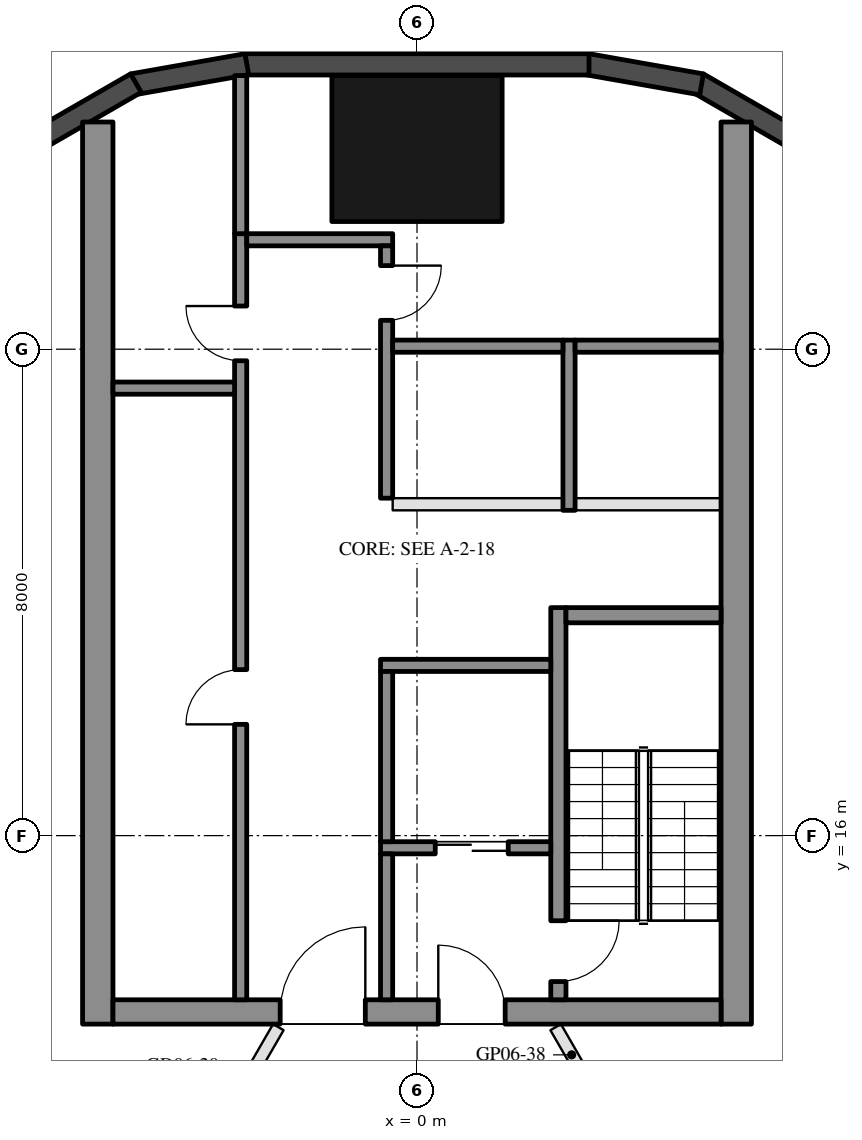
"""IFC4 building model, lengths in metres.
Left out: names, types, materials, properties, quantities, classifications, styles, units other than length and angle.
Written with IfcOpenShell. Run it as: python <this file> out.ifc"""

import sys

from ifc_helpers import new_model, si_unit, direction, frame, frame_2d, origin, origin_2d, place, context, subcontext, project, spatial, rectangle, hollow_rectangle, extrude, element, fill, save


model = new_model("IFC4")
c1 = context("Model", 3, precision=1e-05, world=origin(), true_north=direction((0.0, 1.0)))
c2 = subcontext(c1, "Body", "Model", "MODEL_VIEW")
j1 = project(units=[si_unit("LENGTHUNIT", "METRE"), si_unit("PLANEANGLEUNIT", "RADIAN")], contexts=[c1])
p1 = place(None, origin())
s1 = spatial("IfcSite", under=j1, at=p1, CompositionType="ELEMENT")
p2 = place(p1, origin())
s2 = spatial("IfcBuilding", under=s1, at=p2, CompositionType="ELEMENT")
p3 = place(p2, frame((0.0, 0.0, 87.2)))
s3 = spatial("IfcBuildingStorey", under=s2, at=p3, CompositionType="ELEMENT", Elevation=87.2)
p4 = place(p3, frame((0.0, 27.3, 0.0), z_axis=(0.0, 0.0, 1.0), x_axis=(1.0, 0.0, 0.0)))
e1 = element("IfcColumn", 1, at=p4, inside=s3, PredefinedType="COLUMN", context=c2, shape_type="SweptSolid", body=[
    extrude(hollow_rectangle(XDim=2.8, YDim=2.4, WallThickness=0.07, at=origin_2d()), origin(), (0.0, 0.0, 1.0), 3.7),
])
for number, where, z_axis, x_axis in (
    (2, (6.277, 27.422, 0.0), (0.0, 0.0, 1.0), (-0.866, 0.5, 0.0)),
    (3, (4.68, 28.356, 0.0), (0.0, 0.0, 1.0), (-0.985, 0.174, 0.0)),
):
    element("IfcWall", number, at=place(p3, frame(where, z_axis=z_axis, x_axis=x_axis)), inside=s3, PredefinedType="SOLIDWALL", context=c2, shape_type="SweptSolid", body=[
        extrude(rectangle(XDim=1.91, YDim=0.35, at=frame_2d((0.955, 0.0))), origin(), (0.0, 0.0, 1.0), 3.55),
    ])
p5 = place(p3, frame((2.829, 28.685, 0.0), z_axis=(0.0, 0.0, 1.0), x_axis=(-1.0, 0.0, 0.0)))
e4 = element("IfcWall", 4, at=p5, inside=s3, PredefinedType="SOLIDWALL", context=c2, shape_type="SweptSolid", body=[
    extrude(rectangle(XDim=5.658, YDim=0.35, at=frame_2d((2.829, 0.0))), origin(), (0.0, 0.0, 1.0), 3.55),
])
for number, where, z_axis, x_axis in (
    (5, (-2.799, 28.688, 0.0), (0.0, 0.0, 1.0), (-0.985, -0.174, 0.0)),
    (6, (-4.623, 28.377, 0.0), (0.0, 0.0, 1.0), (-0.866, -0.5, 0.0)),
):
    element("IfcWall", number, at=place(p3, frame(where, z_axis=z_axis, x_axis=x_axis)), inside=s3, PredefinedType="SOLIDWALL", context=c2, shape_type="SweptSolid", body=[
        extrude(rectangle(XDim=1.91, YDim=0.35, at=frame_2d((0.955, 0.0))), origin(), (0.0, 0.0, 1.0), 3.55),
    ])
for number, where, z_axis, x_axis in (
    (7, (5.25, 12.9, 0.0), (0.0, 0.0, 1.0), (0.0, 1.0, 0.0)),
    (8, (-5.25, 12.9, 0.0), (0.0, 0.0, 1.0), (0.0, 1.0, 0.0)),
):
    element("IfcWall", number, at=place(p3, frame(where, z_axis=z_axis, x_axis=x_axis)), inside=s3, PredefinedType="SHEAR", context=c2, shape_type="SweptSolid", body=[
        extrude(rectangle(XDim=14.837, YDim=0.5, at=frame_2d((7.418, 0.0))), origin(), (0.0, 0.0, 1.0), 3.5),
    ])
p6 = place(p3, frame((5.0, 13.1, 0.0), z_axis=(0.0, 0.0, 1.0), x_axis=(-1.0, 0.0, 0.0)))
e9 = element("IfcWall", 9, at=p6, inside=s3, PredefinedType="SHEAR", context=c2, shape_type="SweptSolid", body=[
    extrude(rectangle(XDim=10.0, YDim=0.4, at=frame_2d((5.0, 0.0))), origin(), (0.0, 0.0, 1.0), 3.5),
])
p7 = place(p6, frame((3.55, 0.0, 0.0)))
e10 = element("IfcOpeningElement", 10, at=p7, cuts=e9, PredefinedType="OPENING", context=c2, shape_type="SweptSolid", body=[
    extrude(rectangle(XDim=1.1, YDim=2.1, at=frame_2d((0.55, 1.05))), frame((0.0, 0.21, 0.0), z_axis=(0.0, -1.0, 0.0), x_axis=(1.0, 0.0, 0.0)), (0.0, 0.0, 1.0), 0.42),
])
p8 = place(p6, frame((5.85, 0.0, 0.0)))
e11 = element("IfcOpeningElement", 11, at=p8, cuts=e9, PredefinedType="OPENING", context=c2, shape_type="SweptSolid", body=[
    extrude(rectangle(XDim=1.4, YDim=2.1, at=frame_2d((0.7, 1.05))), frame((0.0, 0.21, 0.0), z_axis=(0.0, -1.0, 0.0), x_axis=(1.0, 0.0, 0.0)), (0.0, 0.0, 1.0), 0.42),
])
p9 = place(p3, frame((2.325, 13.3, 0.0), z_axis=(0.0, 0.0, 1.0), x_axis=(0.0, 1.0, 0.0)))
e12 = element("IfcWall", 12, at=p9, inside=s3, PredefinedType="SHEAR", context=c2, shape_type="SweptSolid", body=[
    extrude(rectangle(XDim=6.45, YDim=0.25, at=frame_2d((3.225, 0.0))), origin(), (0.0, 0.0, 1.0), 3.5),
])
p10 = place(p9, frame((0.3, 0.0, 0.0)))
e13 = element("IfcOpeningElement", 13, at=p10, cuts=e12, PredefinedType="OPENING", context=c2, shape_type="SweptSolid", body=[
    extrude(rectangle(XDim=1.0, YDim=2.1, at=frame_2d((0.5, 1.05))), frame((0.0, 0.135, 0.0), z_axis=(0.0, -1.0, 0.0), x_axis=(1.0, 0.0, 0.0)), (0.0, 0.0, 1.0), 0.27),
])
p11 = place(p3, frame((5.0, 19.625, 0.0), z_axis=(0.0, 0.0, 1.0), x_axis=(-1.0, 0.0, 0.0)))
e14 = element("IfcWall", 14, at=p11, inside=s3, PredefinedType="SHEAR", context=c2, shape_type="SweptSolid", body=[
    extrude(rectangle(XDim=2.55, YDim=0.25, at=frame_2d((1.275, 0.0))), origin(), (0.0, 0.0, 1.0), 3.5),
])
p12 = place(p3, frame((2.2, 18.8, 0.0), z_axis=(0.0, 0.0, 1.0), x_axis=(-1.0, 0.0, 0.0)))
e15 = element("IfcWall", 15, at=p12, inside=s3, PredefinedType="SHEAR", context=c2, shape_type="SweptSolid", body=[
    extrude(rectangle(XDim=2.8, YDim=0.2, at=frame_2d((1.4, 0.0))), origin(), (0.0, 0.0, 1.0), 3.5),
])
p13 = place(p3, frame((2.2, 15.8, 0.0), z_axis=(0.0, 0.0, 1.0), x_axis=(-1.0, 0.0, 0.0)))
e16 = element("IfcWall", 16, at=p13, inside=s3, PredefinedType="SHEAR", context=c2, shape_type="SweptSolid", body=[
    extrude(rectangle(XDim=2.8, YDim=0.2, at=frame_2d((1.4, 0.0))), origin(), (0.0, 0.0, 1.0), 3.5),
])
p14 = place(p13, frame((0.7, 0.0, 0.0)))
e17 = element("IfcOpeningElement", 17, at=p14, cuts=e16, PredefinedType="OPENING", context=c2, shape_type="SweptSolid", body=[
    extrude(rectangle(XDim=1.2, YDim=2.1, at=frame_2d((0.6, 1.05))), frame((0.0, 0.11, 0.0), z_axis=(0.0, -1.0, 0.0), x_axis=(1.0, 0.0, 0.0)), (0.0, 0.0, 1.0), 0.22),
])
p15 = place(p3, frame((-0.5, 15.9, 0.0), z_axis=(0.0, 0.0, 1.0), x_axis=(0.0, 1.0, 0.0)))
e18 = element("IfcWall", 18, at=p15, inside=s3, PredefinedType="SHEAR", context=c2, shape_type="SweptSolid", body=[
    extrude(rectangle(XDim=2.8, YDim=0.2, at=frame_2d((1.4, 0.0))), origin(), (0.0, 0.0, 1.0), 3.5),
])
p16 = place(p3, frame((-0.5, 13.3, 0.0), z_axis=(0.0, 0.0, 1.0), x_axis=(0.0, 1.0, 0.0)))
e19 = element("IfcWall", 19, at=p16, inside=s3, PredefinedType="SHEAR", context=c2, shape_type="SweptSolid", body=[
    extrude(rectangle(XDim=2.4, YDim=0.2, at=frame_2d((1.2, 0.0))), origin(), (0.0, 0.0, 1.0), 3.5),
])
p17 = place(p3, frame((-2.9, 13.3, 0.0), z_axis=(0.0, 0.0, 1.0), x_axis=(0.0, 1.0, 0.0)))
e20 = element("IfcWall", 20, at=p17, inside=s3, PredefinedType="SHEAR", context=c2, shape_type="SweptSolid", body=[
    extrude(rectangle(XDim=12.6, YDim=0.2, at=frame_2d((6.3, 0.0))), origin(), (0.0, 0.0, 1.0), 3.5),
])
p18 = place(p17, frame((4.53, 0.0, 0.0)))
e21 = element("IfcOpeningElement", 21, at=p18, cuts=e20, PredefinedType="OPENING", context=c2, shape_type="SweptSolid", body=[
    extrude(rectangle(XDim=0.9, YDim=2.1, at=frame_2d((0.45, 1.05))), frame((0.0, 0.11, 0.0), z_axis=(0.0, -1.0, 0.0), x_axis=(1.0, 0.0, 0.0)), (0.0, 0.0, 1.0), 0.22),
])
p19 = place(p17, frame((10.51, 0.0, 0.0)))
e22 = element("IfcOpeningElement", 22, at=p19, cuts=e20, PredefinedType="OPENING", context=c2, shape_type="SweptSolid", body=[
    extrude(rectangle(XDim=0.9, YDim=2.1, at=frame_2d((0.45, 1.05))), frame((0.0, 0.11, 0.0), z_axis=(0.0, -1.0, 0.0), x_axis=(1.0, 0.0, 0.0)), (0.0, 0.0, 1.0), 0.22),
])
p20 = place(p3, frame((-0.4, 25.8, 0.0), z_axis=(0.0, 0.0, 1.0), x_axis=(-1.0, 0.0, 0.0)))
e23 = element("IfcWall", 23, at=p20, inside=s3, PredefinedType="SHEAR", context=c2, shape_type="SweptSolid", body=[
    extrude(rectangle(XDim=2.4, YDim=0.2, at=frame_2d((1.2, 0.0))), origin(), (0.0, 0.0, 1.0), 3.5),
])
p21 = place(p3, frame((-0.5, 21.55, 0.0), z_axis=(0.0, 0.0, 1.0), x_axis=(0.0, 1.0, 0.0)))
e24 = element("IfcWall", 24, at=p21, inside=s3, PredefinedType="SHEAR", context=c2, shape_type="SweptSolid", body=[
    extrude(rectangle(XDim=4.15, YDim=0.2, at=frame_2d((2.075, 0.0))), origin(), (0.0, 0.0, 1.0), 3.5),
])
p22 = place(p21, frame((2.925, 0.0, 0.0)))
e25 = element("IfcOpeningElement", 25, at=p22, cuts=e24, PredefinedType="OPENING", context=c2, shape_type="SweptSolid", body=[
    extrude(rectangle(XDim=0.9, YDim=2.1, at=frame_2d((0.45, 1.05))), frame((0.0, 0.11, 0.0), z_axis=(0.0, -1.0, 0.0), x_axis=(1.0, 0.0, 0.0)), (0.0, 0.0, 1.0), 0.22),
])
p23 = place(p3, frame((-3.0, 23.36, 0.0), z_axis=(0.0, 0.0, 1.0), x_axis=(-1.0, 0.0, 0.0)))
e26 = element("IfcWall", 26, at=p23, inside=s3, PredefinedType="SHEAR", context=c2, shape_type="SweptSolid", body=[
    extrude(rectangle(XDim=2.0, YDim=0.2, at=frame_2d((1.0, 0.0))), origin(), (0.0, 0.0, 1.0), 3.5),
])
p24 = place(p3, frame((-2.9, 25.9, 0.0), z_axis=(0.0, 0.0, 1.0), x_axis=(0.0, 1.0, 0.0)))
e27 = element("IfcWall", 27, at=p24, inside=s3, PredefinedType="SHEAR", context=c2, shape_type="SweptSolid", body=[
    extrude(rectangle(XDim=2.6, YDim=0.2, at=frame_2d((1.3, 0.0))), origin(), (0.0, 0.0, 1.0), 3.5),
])
p25 = place(p3, frame((2.5, 21.35, 0.0), z_axis=(0.0, 0.0, 1.0), x_axis=(0.0, 1.0, 0.0)))
e28 = element("IfcWall", 28, at=p25, inside=s3, PredefinedType="SHEAR", context=c2, shape_type="SweptSolid", body=[
    extrude(rectangle(XDim=2.8, YDim=0.2, at=frame_2d((1.4, 0.0))), origin(), (0.0, 0.0, 1.0), 3.5),
])
p26 = place(p3, frame((5.0, 24.05, 0.0), z_axis=(0.0, 0.0, 1.0), x_axis=(-1.0, 0.0, 0.0)))
e29 = element("IfcWall", 29, at=p26, inside=s3, PredefinedType="SHEAR", context=c2, shape_type="SweptSolid", body=[
    extrude(rectangle(XDim=2.4, YDim=0.2, at=frame_2d((1.2, 0.0))), origin(), (0.0, 0.0, 1.0), 3.5),
])
p27 = place(p3, frame((2.4, 24.05, 0.0), z_axis=(0.0, 0.0, 1.0), x_axis=(-1.0, 0.0, 0.0)))
e30 = element("IfcWall", 30, at=p27, inside=s3, PredefinedType="SHEAR", context=c2, shape_type="SweptSolid", body=[
    extrude(rectangle(XDim=2.8, YDim=0.2, at=frame_2d((1.4, 0.0))), origin(), (0.0, 0.0, 1.0), 3.5),
])
p28 = place(p3, frame((5.0, 21.45, 0.0), z_axis=(0.0, 0.0, 1.0), x_axis=(-1.0, 0.0, 0.0)))
e31 = element("IfcWall", 31, at=p28, inside=s3, PredefinedType="PARTITIONING", context=c2, shape_type="SweptSolid", body=[
    extrude(rectangle(XDim=2.4, YDim=0.2, at=frame_2d((1.2, 0.0))), origin(), (0.0, 0.0, 1.0), 3.5),
])
p29 = place(p3, frame((2.4, 21.45, 0.0), z_axis=(0.0, 0.0, 1.0), x_axis=(-1.0, 0.0, 0.0)))
e32 = element("IfcWall", 32, at=p29, inside=s3, PredefinedType="PARTITIONING", context=c2, shape_type="SweptSolid", body=[
    extrude(rectangle(XDim=2.8, YDim=0.2, at=frame_2d((1.4, 0.0))), origin(), (0.0, 0.0, 1.0), 3.5),
])
p30 = place(p3, frame((14.222, 13.927, 0.0), z_axis=(0.0, 0.0, 1.0), x_axis=(-0.890385282198, -0.455207699017, 0.0)))
e33 = element("IfcWall", 33, at=p30, inside=s3, PredefinedType="PARTITIONING", context=c2, shape_type="SweptSolid", body=[
    extrude(rectangle(XDim=10.994, YDim=0.2, at=frame_2d((5.497, 0.0))), origin(), (0.0, 0.0, 1.0), 2.96),
])
p31 = place(p3, frame((-13.192, 13.91, 0.0), z_axis=(0.0, 0.0, 1.0), x_axis=(0.892469554868, -0.451107629766, 0.0)))
e34 = element("IfcWall", 34, at=p31, inside=s3, PredefinedType="PARTITIONING", context=c2, shape_type="SweptSolid", body=[
    extrude(rectangle(XDim=10.096, YDim=0.2, at=frame_2d((5.048, 0.0))), origin(), (0.0, 0.0, 1.0), 2.96),
])
p32 = place(p3, frame((2.281, 12.85, 0.0), z_axis=(0.0, 0.0, 1.0), x_axis=(0.499973180286, -0.8660408876, 0.0)))
e35 = element("IfcWall", 35, at=p32, inside=s3, PredefinedType="PARTITIONING", context=c2, shape_type="SweptSolid", body=[
    extrude(rectangle(XDim=4.383, YDim=0.2, at=frame_2d((2.191, 0.0))), origin(), (0.0, 0.0, 1.0), 2.95),
])
p33 = place(p32, frame((1.691, 0.0, 0.0)))
e36 = element("IfcOpeningElement", 36, at=p33, cuts=e35, PredefinedType="OPENING", context=c2, shape_type="SweptSolid", body=[
    extrude(rectangle(XDim=1.0, YDim=2.1, at=frame_2d((0.5, 1.05))), frame((0.0, 0.11, 0.0), z_axis=(0.0, -1.0, 0.0), x_axis=(1.0, 0.0, 0.0)), (0.0, 0.0, 1.0), 0.22),
])
p34 = place(p3, frame((-4.222, 9.488, 0.0), z_axis=(0.0, 0.0, 1.0), x_axis=(0.49998736472, 0.866032698644, 0.0)))
e37 = element("IfcWall", 37, at=p34, inside=s3, PredefinedType="PARTITIONING", context=c2, shape_type="SweptSolid", body=[
    extrude(rectangle(XDim=3.882, YDim=0.2, at=frame_2d((1.941, 0.0))), origin(), (0.0, 0.0, 1.0), 2.95),
])
p35 = place(p34, frame((1.441, 0.0, 0.0)))
e38 = element("IfcOpeningElement", 38, at=p35, cuts=e37, PredefinedType="OPENING", context=c2, shape_type="SweptSolid", body=[
    extrude(rectangle(XDim=1.0, YDim=2.1, at=frame_2d((0.5, 1.05))), frame((0.0, 0.11, 0.0), z_axis=(0.0, -1.0, 0.0), x_axis=(1.0, 0.0, 0.0)), (0.0, 0.0, 1.0), 0.22),
])
p36 = place(p14, origin())
e39 = element("IfcDoor", 39, at=p36, inside=s3, OperationType="DOUBLE_DOOR_SLIDING", PredefinedType="DOOR", context=c2, shape_type="SweptSolid", body=[
    extrude(rectangle(XDim=1.2, YDim=2.1, at=frame_2d((0.6, 1.05))), frame((0.0, 0.025, 0.0), z_axis=(0.0, -1.0, 0.0), x_axis=(1.0, 0.0, 0.0)), (0.0, 0.0, 1.0), 0.05),
])
fill(e17, e39)
p37 = place(p18, origin())
e40 = element("IfcDoor", 40, at=p37, inside=s3, OperationType="SINGLE_SWING_LEFT", PredefinedType="DOOR", context=c2, shape_type="SweptSolid", body=[
    extrude(rectangle(XDim=0.9, YDim=2.1, at=frame_2d((0.45, 1.05))), frame((0.0, 0.025, 0.0), z_axis=(0.0, -1.0, 0.0), x_axis=(1.0, 0.0, 0.0)), (0.0, 0.0, 1.0), 0.05),
])
fill(e21, e40)
p38 = place(p19, origin())
e41 = element("IfcDoor", 41, at=p38, inside=s3, OperationType="SINGLE_SWING_RIGHT", PredefinedType="DOOR", context=c2, shape_type="SweptSolid", body=[
    extrude(rectangle(XDim=0.9, YDim=2.1, at=frame_2d((0.45, 1.05))), frame((0.0, 0.025, 0.0), z_axis=(0.0, -1.0, 0.0), x_axis=(1.0, 0.0, 0.0)), (0.0, 0.0, 1.0), 0.05),
])
fill(e22, e41)
p39 = place(p22, frame((0.9, 0.0, 0.0), z_axis=(0.0, 0.0, 1.0), x_axis=(-1.0, 0.0, 0.0)))
e42 = element("IfcDoor", 42, at=p39, inside=s3, OperationType="SINGLE_SWING_LEFT", PredefinedType="DOOR", context=c2, shape_type="SweptSolid", body=[
    extrude(rectangle(XDim=0.9, YDim=2.1, at=frame_2d((0.45, 1.05))), frame((0.0, 0.025, 0.0), z_axis=(0.0, -1.0, 0.0), x_axis=(1.0, 0.0, 0.0)), (0.0, 0.0, 1.0), 0.05),
])
fill(e25, e42)
p40 = place(p7, frame((1.1, 0.0, 0.0), z_axis=(0.0, 0.0, 1.0), x_axis=(-1.0, 0.0, 0.0)))
e43 = element("IfcDoor", 43, at=p40, inside=s3, OperationType="SINGLE_SWING_LEFT", PredefinedType="DOOR", context=c2, shape_type="SweptSolid", body=[
    extrude(rectangle(XDim=1.1, YDim=2.1, at=frame_2d((0.55, 1.05))), frame((0.0, 0.025, 0.0), z_axis=(0.0, -1.0, 0.0), x_axis=(1.0, 0.0, 0.0)), (0.0, 0.0, 1.0), 0.05),
])
fill(e10, e43)
p41 = place(p8, frame((1.4, 0.0, 0.0), z_axis=(0.0, 0.0, 1.0), x_axis=(-1.0, 0.0, 0.0)))
e44 = element("IfcDoor", 44, at=p41, inside=s3, OperationType="DOUBLE_DOOR_SINGLE_SWING", PredefinedType="DOOR", context=c2, shape_type="SweptSolid", body=[
    extrude(rectangle(XDim=1.4, YDim=2.1, at=frame_2d((0.7, 1.05))), frame((0.0, 0.025, 0.0), z_axis=(0.0, -1.0, 0.0), x_axis=(1.0, 0.0, 0.0)), (0.0, 0.0, 1.0), 0.05),
])
fill(e11, e44)
p42 = place(p10, frame((1.0, 0.0, 0.0), z_axis=(0.0, 0.0, 1.0), x_axis=(-1.0, 0.0, 0.0)))
e45 = element("IfcDoor", 45, at=p42, inside=s3, OperationType="SINGLE_SWING_LEFT", PredefinedType="DOOR", context=c2, shape_type="SweptSolid", body=[
    extrude(rectangle(XDim=1.0, YDim=2.1, at=frame_2d((0.5, 1.05))), frame((0.0, 0.025, 0.0), z_axis=(0.0, -1.0, 0.0), x_axis=(1.0, 0.0, 0.0)), (0.0, 0.0, 1.0), 0.05),
])
fill(e13, e45)
save(model, sys.argv[1])
